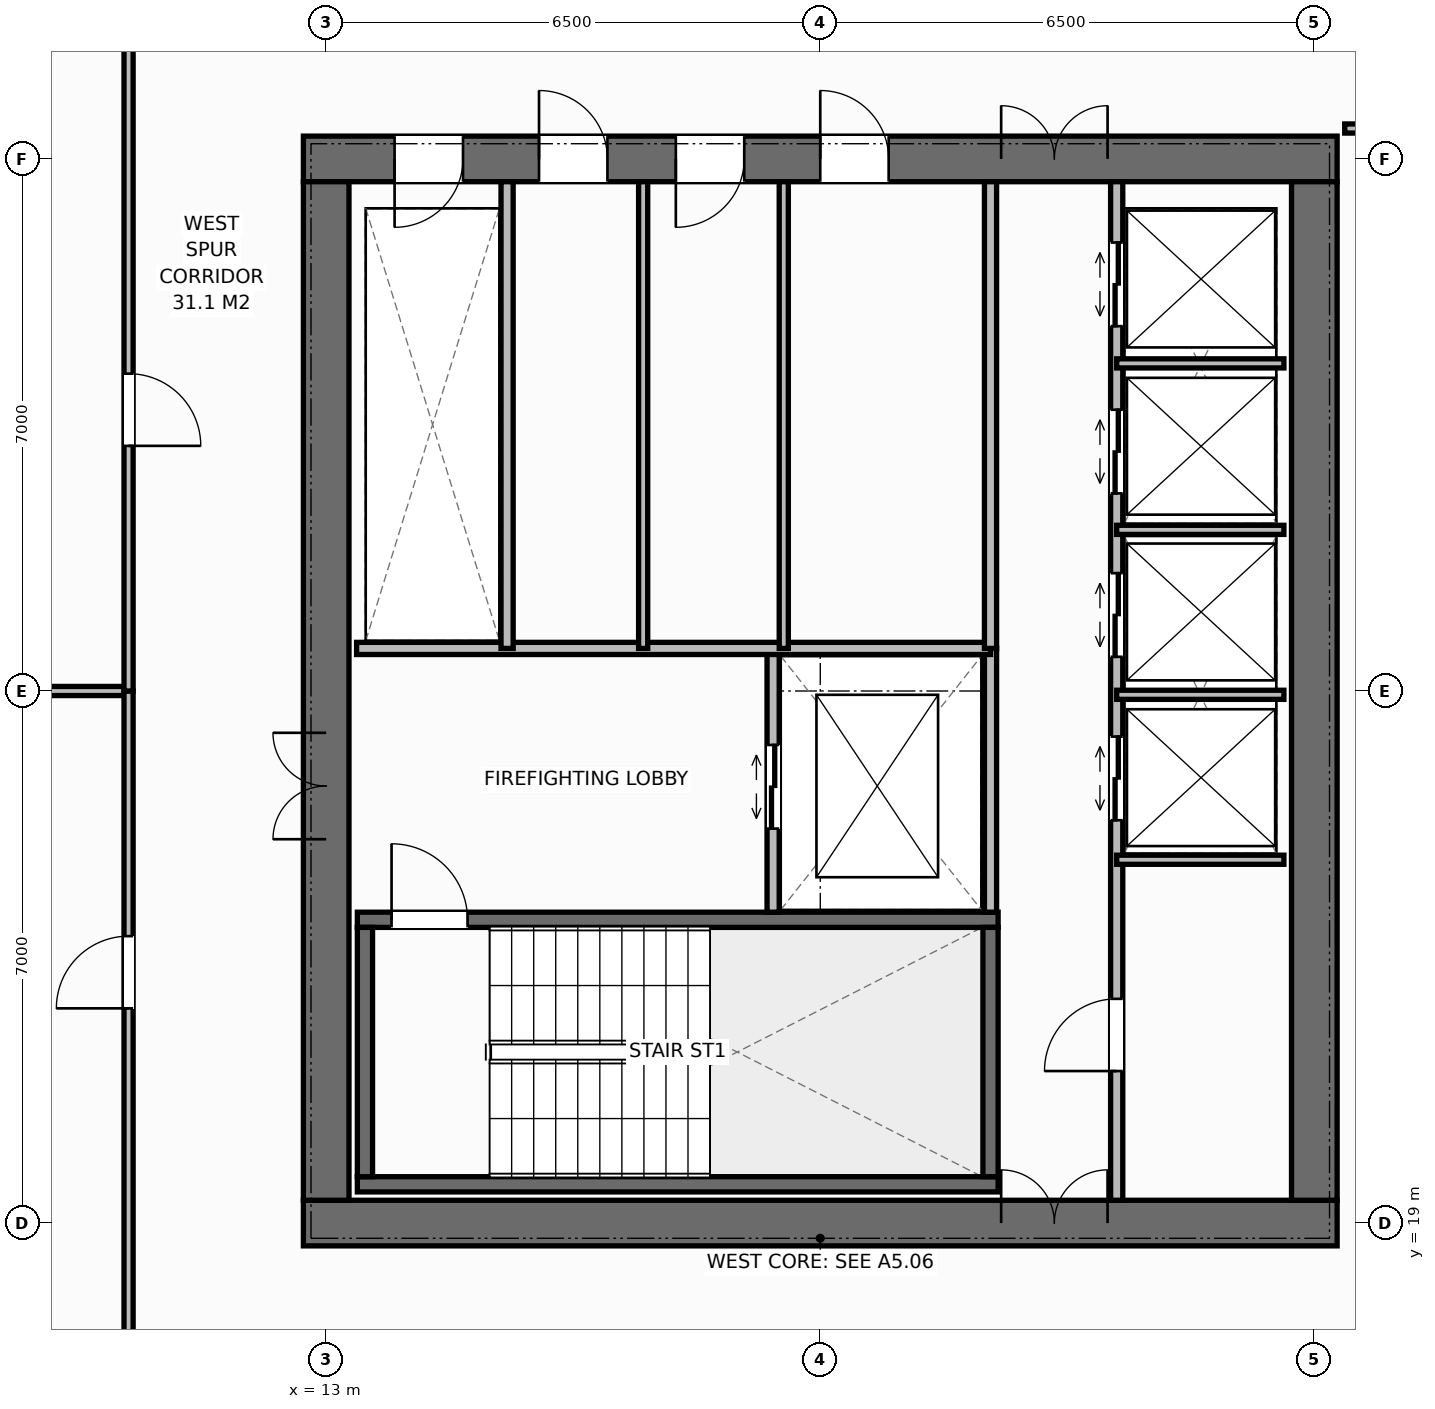
"""IFC4 building model, lengths in metres.
Left out: names, types, materials, properties, quantities, classifications, styles, units other than length and angle.
Written with IfcOpenShell. Run it as: python <this file> out.ifc"""

import sys

from ifc_helpers import new_model, si_unit, direction, frame, frame_2d, origin, place, context, subcontext, project, spatial, rectangle, extrude, element, fill, save


model = new_model("IFC4")
c1 = context("Model", 3, precision=1e-05, world=origin(), true_north=direction((0.0, 1.0)))
c2 = subcontext(c1, "Body", "Model", "MODEL_VIEW")
j1 = project(units=[si_unit("LENGTHUNIT", "METRE"), si_unit("PLANEANGLEUNIT", "RADIAN")], contexts=[c1])
p1 = place(None, origin())
s1 = spatial("IfcSite", under=j1, at=p1, CompositionType="ELEMENT")
p2 = place(p1, origin())
s2 = spatial("IfcBuilding", under=s1, at=p2, CompositionType="ELEMENT")
p3 = place(p2, frame((0.0, 0.0, 144.2)))
s3 = spatial("IfcBuildingStorey", under=s2, at=p3, CompositionType="ELEMENT", Elevation=144.2)
p4 = place(p3, frame((12.7, 19.0, 0.0), z_axis=(0.0, 0.0, 1.0), x_axis=(1.0, 0.0, 0.0)))
e1 = element("IfcWall", 1, at=p4, inside=s3, PredefinedType="SHEAR", context=c2, shape_type="SweptSolid", body=[
    extrude(rectangle(XDim=13.6, YDim=0.6, at=frame_2d((6.8, 0.0))), origin(), (0.0, 0.0, 1.0), 3.8),
])
p5 = place(p4, frame((9.18, 0.0, 0.0)))
e2 = element("IfcOpeningElement", 2, at=p5, cuts=e1, PredefinedType="OPENING", context=c2, shape_type="SweptSolid", body=[
    extrude(rectangle(XDim=1.4, YDim=2.2, at=frame_2d((0.7, 1.1))), frame((0.0, 0.31, 0.0), z_axis=(0.0, -1.0, 0.0), x_axis=(1.0, 0.0, 0.0)), (0.0, 0.0, 1.0), 0.62),
])
p6 = place(p3, frame((12.7, 33.0, 0.0), z_axis=(0.0, 0.0, 1.0), x_axis=(1.0, 0.0, 0.0)))
e3 = element("IfcWall", 3, at=p6, inside=s3, PredefinedType="SHEAR", context=c2, shape_type="SweptSolid", body=[
    extrude(rectangle(XDim=13.6, YDim=0.6, at=frame_2d((6.8, 0.0))), origin(), (0.0, 0.0, 1.0), 3.8),
])
p7 = place(p6, frame((1.2, 0.0, 0.0)))
e4 = element("IfcOpeningElement", 4, at=p7, cuts=e3, PredefinedType="OPENING", context=c2, shape_type="SweptSolid", body=[
    extrude(rectangle(XDim=0.9, YDim=2.15, at=frame_2d((0.45, 1.075))), frame((0.0, 0.31, 0.0), z_axis=(0.0, -1.0, 0.0), x_axis=(1.0, 0.0, 0.0)), (0.0, 0.0, 1.0), 0.62),
])
p8 = place(p6, frame((3.1, 0.0, 0.0)))
e5 = element("IfcOpeningElement", 5, at=p8, cuts=e3, PredefinedType="OPENING", context=c2, shape_type="SweptSolid", body=[
    extrude(rectangle(XDim=0.9, YDim=2.15, at=frame_2d((0.45, 1.075))), frame((0.0, 0.31, 0.0), z_axis=(0.0, -1.0, 0.0), x_axis=(1.0, 0.0, 0.0)), (0.0, 0.0, 1.0), 0.62),
])
p9 = place(p6, frame((4.9, 0.0, 0.0)))
e6 = element("IfcOpeningElement", 6, at=p9, cuts=e3, PredefinedType="OPENING", context=c2, shape_type="SweptSolid", body=[
    extrude(rectangle(XDim=0.9, YDim=2.15, at=frame_2d((0.45, 1.075))), frame((0.0, 0.31, 0.0), z_axis=(0.0, -1.0, 0.0), x_axis=(1.0, 0.0, 0.0)), (0.0, 0.0, 1.0), 0.62),
])
p10 = place(p6, frame((6.8, 0.0, 0.0)))
e7 = element("IfcOpeningElement", 7, at=p10, cuts=e3, PredefinedType="OPENING", context=c2, shape_type="SweptSolid", body=[
    extrude(rectangle(XDim=0.9, YDim=2.15, at=frame_2d((0.45, 1.075))), frame((0.0, 0.31, 0.0), z_axis=(0.0, -1.0, 0.0), x_axis=(1.0, 0.0, 0.0)), (0.0, 0.0, 1.0), 0.62),
])
p11 = place(p6, frame((9.18, 0.0, 0.0)))
e8 = element("IfcOpeningElement", 8, at=p11, cuts=e3, PredefinedType="OPENING", context=c2, shape_type="SweptSolid", body=[
    extrude(rectangle(XDim=1.4, YDim=2.2, at=frame_2d((0.7, 1.1))), frame((0.0, 0.31, 0.0), z_axis=(0.0, -1.0, 0.0), x_axis=(1.0, 0.0, 0.0)), (0.0, 0.0, 1.0), 0.62),
])
p12 = place(p3, frame((13.0, 19.3, 0.0), z_axis=(0.0, 0.0, 1.0), x_axis=(0.0, 1.0, 0.0)))
e9 = element("IfcWall", 9, at=p12, inside=s3, PredefinedType="SHEAR", context=c2, shape_type="SweptSolid", body=[
    extrude(rectangle(XDim=13.4, YDim=0.6, at=frame_2d((6.7, 0.0))), origin(), (0.0, 0.0, 1.0), 3.8),
])
p13 = place(p12, frame((4.75, 0.0, 0.0)))
e10 = element("IfcOpeningElement", 10, at=p13, cuts=e9, PredefinedType="OPENING", context=c2, shape_type="SweptSolid", body=[
    extrude(rectangle(XDim=1.4, YDim=2.2, at=frame_2d((0.7, 1.1))), frame((0.0, 0.31, 0.0), z_axis=(0.0, -1.0, 0.0), x_axis=(1.0, 0.0, 0.0)), (0.0, 0.0, 1.0), 0.62),
])
p14 = place(p3, frame((26.0, 19.3, 0.0), z_axis=(0.0, 0.0, 1.0), x_axis=(0.0, 1.0, 0.0)))
e11 = element("IfcWall", 11, at=p14, inside=s3, PredefinedType="SHEAR", context=c2, shape_type="SweptSolid", body=[
    extrude(rectangle(XDim=13.4, YDim=0.6, at=frame_2d((6.7, 0.0))), origin(), (0.0, 0.0, 1.0), 3.8),
])
p15 = place(p3, frame((13.41, 19.51, 0.0), z_axis=(0.0, 0.0, 1.0), x_axis=(1.0, 0.0, 0.0)))
e12 = element("IfcWall", 12, at=p15, inside=s3, PredefinedType="SHEAR", context=c2, shape_type="SweptSolid", body=[
    extrude(rectangle(XDim=8.43, YDim=0.2, at=frame_2d((4.215, 0.0))), origin(), (0.0, 0.0, 1.0), 3.8),
])
p16 = place(p3, frame((13.41, 22.99, 0.0), z_axis=(0.0, 0.0, 1.0), x_axis=(1.0, 0.0, 0.0)))
e13 = element("IfcWall", 13, at=p16, inside=s3, PredefinedType="SHEAR", context=c2, shape_type="SweptSolid", body=[
    extrude(rectangle(XDim=8.43, YDim=0.2, at=frame_2d((4.215, 0.0))), origin(), (0.0, 0.0, 1.0), 3.8),
])
p17 = place(p16, frame((0.45, 0.0, 0.0)))
e14 = element("IfcOpeningElement", 14, at=p17, cuts=e13, PredefinedType="OPENING", context=c2, shape_type="SweptSolid", body=[
    extrude(rectangle(XDim=1.0, YDim=2.15, at=frame_2d((0.5, 1.075))), frame((0.0, 0.11, 0.0), z_axis=(0.0, -1.0, 0.0), x_axis=(1.0, 0.0, 0.0)), (0.0, 0.0, 1.0), 0.22),
])
for number, where, z_axis, x_axis in (
    (15, (13.51, 19.61, 0.0), (0.0, 0.0, 1.0), (0.0, 1.0, 0.0)),
    (16, (21.74, 19.61, 0.0), (0.0, 0.0, 1.0), (0.0, 1.0, 0.0)),
):
    element("IfcWall", number, at=place(p3, frame(where, z_axis=z_axis, x_axis=x_axis)), inside=s3, PredefinedType="SHEAR", context=c2, shape_type="SweptSolid", body=[
        extrude(rectangle(XDim=3.28, YDim=0.2, at=frame_2d((1.64, 0.0))), origin(), (0.0, 0.0, 1.0), 3.8),
    ])
p18 = place(p3, frame((21.74, 23.09, 0.0), z_axis=(0.0, 0.0, 1.0), x_axis=(0.0, 1.0, 0.0)))
e17 = element("IfcWall", 17, at=p18, inside=s3, PredefinedType="STANDARD", context=c2, shape_type="SweptSolid", body=[
    extrude(rectangle(XDim=3.47, YDim=0.16, at=frame_2d((1.735, 0.0))), origin(), (0.0, 0.0, 1.0), 3.572),
])
p19 = place(p3, frame((18.88, 23.09, 0.0), z_axis=(0.0, 0.0, 1.0), x_axis=(0.0, 1.0, 0.0)))
e18 = element("IfcWall", 18, at=p19, inside=s3, PredefinedType="STANDARD", context=c2, shape_type="SweptSolid", body=[
    extrude(rectangle(XDim=3.47, YDim=0.16, at=frame_2d((1.735, 0.0))), origin(), (0.0, 0.0, 1.0), 3.572),
])
p20 = place(p19, frame((1.1, 0.0, 0.0)))
e19 = element("IfcOpeningElement", 19, at=p20, cuts=e18, PredefinedType="OPENING", context=c2, shape_type="SweptSolid", body=[
    extrude(rectangle(XDim=1.1, YDim=2.2, at=frame_2d((0.55, 1.1))), frame((0.0, 0.09, 0.0), z_axis=(0.0, -1.0, 0.0), x_axis=(1.0, 0.0, 0.0)), (0.0, 0.0, 1.0), 0.18),
])
p21 = place(p3, frame((13.4, 26.56, 0.0), z_axis=(0.0, 0.0, 1.0), x_axis=(1.0, 0.0, 0.0)))
e20 = element("IfcWall", 20, at=p21, inside=s3, PredefinedType="STANDARD", context=c2, shape_type="SweptSolid", body=[
    extrude(rectangle(XDim=8.34, YDim=0.16, at=frame_2d((4.17, 0.0))), origin(), (0.0, 0.0, 1.0), 3.572),
])
p22 = place(p3, frame((15.38, 26.56, 0.0), z_axis=(0.0, 0.0, 1.0), x_axis=(0.0, 1.0, 0.0)))
e21 = element("IfcWall", 21, at=p22, inside=s3, PredefinedType="STANDARD", context=c2, shape_type="SweptSolid", body=[
    extrude(rectangle(XDim=6.14, YDim=0.16, at=frame_2d((3.07, 0.0))), origin(), (0.0, 0.0, 1.0), 3.572),
])
for number, where, z_axis, x_axis in (
    (22, (17.17, 26.56, 0.0), (0.0, 0.0, 1.0), (0.0, 1.0, 0.0)),
    (23, (19.02, 26.56, 0.0), (0.0, 0.0, 1.0), (0.0, 1.0, 0.0)),
):
    element("IfcWall", number, at=place(p3, frame(where, z_axis=z_axis, x_axis=x_axis)), inside=s3, PredefinedType="PARTITIONING", context=c2, shape_type="SweptSolid", body=[
        extrude(rectangle(XDim=6.14, YDim=0.12, at=frame_2d((3.07, 0.0))), origin(), (0.0, 0.0, 1.0), 3.572),
    ])
p23 = place(p3, frame((21.74, 26.56, 0.0), z_axis=(0.0, 0.0, 1.0), x_axis=(0.0, 1.0, 0.0)))
e24 = element("IfcWall", 24, at=p23, inside=s3, PredefinedType="STANDARD", context=c2, shape_type="SweptSolid", body=[
    extrude(rectangle(XDim=6.14, YDim=0.16, at=frame_2d((3.07, 0.0))), origin(), (0.0, 0.0, 1.0), 3.572),
])
p24 = place(p3, frame((23.4, 19.3, 0.0), z_axis=(0.0, 0.0, 1.0), x_axis=(0.0, 1.0, 0.0)))
e25 = element("IfcWall", 25, at=p24, inside=s3, PredefinedType="STANDARD", context=c2, shape_type="SweptSolid", body=[
    extrude(rectangle(XDim=13.4, YDim=0.16, at=frame_2d((6.7, 0.0))), origin(), (0.0, 0.0, 1.0), 3.572),
])
p25 = place(p24, frame((1.7, 0.0, 0.0)))
e26 = element("IfcOpeningElement", 26, at=p25, cuts=e25, PredefinedType="OPENING", context=c2, shape_type="SweptSolid", body=[
    extrude(rectangle(XDim=0.95, YDim=2.15, at=frame_2d((0.475, 1.075))), frame((0.0, 0.09, 0.0), z_axis=(0.0, -1.0, 0.0), x_axis=(1.0, 0.0, 0.0)), (0.0, 0.0, 1.0), 0.18),
])
p26 = place(p24, frame((5.0, 0.0, 0.0)))
e27 = element("IfcOpeningElement", 27, at=p26, cuts=e25, PredefinedType="OPENING", context=c2, shape_type="SweptSolid", body=[
    extrude(rectangle(XDim=1.1, YDim=2.2, at=frame_2d((0.55, 1.1))), frame((0.0, 0.09, 0.0), z_axis=(0.0, -1.0, 0.0), x_axis=(1.0, 0.0, 0.0)), (0.0, 0.0, 1.0), 0.18),
])
p27 = place(p24, frame((7.15, 0.0, 0.0)))
e28 = element("IfcOpeningElement", 28, at=p27, cuts=e25, PredefinedType="OPENING", context=c2, shape_type="SweptSolid", body=[
    extrude(rectangle(XDim=1.1, YDim=2.2, at=frame_2d((0.55, 1.1))), frame((0.0, 0.09, 0.0), z_axis=(0.0, -1.0, 0.0), x_axis=(1.0, 0.0, 0.0)), (0.0, 0.0, 1.0), 0.18),
])
p28 = place(p24, frame((9.3, 0.0, 0.0)))
e29 = element("IfcOpeningElement", 29, at=p28, cuts=e25, PredefinedType="OPENING", context=c2, shape_type="SweptSolid", body=[
    extrude(rectangle(XDim=1.1, YDim=2.2, at=frame_2d((0.55, 1.1))), frame((0.0, 0.09, 0.0), z_axis=(0.0, -1.0, 0.0), x_axis=(1.0, 0.0, 0.0)), (0.0, 0.0, 1.0), 0.18),
])
p29 = place(p24, frame((11.5, 0.0, 0.0)))
e30 = element("IfcOpeningElement", 30, at=p29, cuts=e25, PredefinedType="OPENING", context=c2, shape_type="SweptSolid", body=[
    extrude(rectangle(XDim=1.1, YDim=2.2, at=frame_2d((0.55, 1.1))), frame((0.0, 0.09, 0.0), z_axis=(0.0, -1.0, 0.0), x_axis=(1.0, 0.0, 0.0)), (0.0, 0.0, 1.0), 0.18),
])
for number, where, z_axis, x_axis in (
    (31, (23.4, 23.78, 0.0), (0.0, 0.0, 1.0), (1.0, 0.0, 0.0)),
    (32, (23.4, 25.95, 0.0), (0.0, 0.0, 1.0), (1.0, 0.0, 0.0)),
    (33, (23.4, 28.12, 0.0), (0.0, 0.0, 1.0), (1.0, 0.0, 0.0)),
    (34, (23.4, 30.31, 0.0), (0.0, 0.0, 1.0), (1.0, 0.0, 0.0)),
):
    element("IfcWall", number, at=place(p3, frame(where, z_axis=z_axis, x_axis=x_axis)), inside=s3, PredefinedType="PARTITIONING", context=c2, shape_type="SweptSolid", body=[
        extrude(rectangle(XDim=2.2, YDim=0.12, at=frame_2d((1.1, 0.0))), origin(), (0.0, 0.0, 1.0), 3.572),
    ])
p30 = place(p3, frame((26.4, 33.4, 0.0), z_axis=(0.0, 0.0, 1.0), x_axis=(1.0, 0.0, 0.0)))
e35 = element("IfcWall", 35, at=p30, inside=s3, PredefinedType="PARTITIONING", context=c2, shape_type="SweptSolid", body=[
    extrude(rectangle(XDim=3.6, YDim=0.12, at=frame_2d((1.8, 0.0))), origin(), (0.0, 0.0, 1.0), 3.572),
])
p31 = place(p30, frame((1.1, 0.0, 0.0)))
e36 = element("IfcOpeningElement", 36, at=p31, cuts=e35, PredefinedType="OPENING", context=c2, shape_type="SweptSolid", body=[
    extrude(rectangle(XDim=0.95, YDim=2.15, at=frame_2d((0.475, 1.075))), frame((0.0, 0.07, 0.0), z_axis=(0.0, -1.0, 0.0), x_axis=(1.0, 0.0, 0.0)), (0.0, 0.0, 1.0), 0.14),
])
p32 = place(p3, frame((3.82, 26.0, 0.0), z_axis=(0.0, 0.0, 1.0), x_axis=(1.0, 0.0, 0.0)))
e37 = element("IfcWall", 37, at=p32, inside=s3, PredefinedType="PARTITIONING", context=c2, shape_type="SweptSolid", body=[
    extrude(rectangle(XDim=6.58, YDim=0.12, at=frame_2d((3.29, 0.0))), origin(), (0.0, 0.0, 1.0), 3.572),
])
p33 = place(p3, frame((10.4, 16.5, 0.0), z_axis=(0.0, 0.0, 1.0), x_axis=(0.0, 1.0, 0.0)))
e38 = element("IfcWall", 38, at=p33, inside=s3, PredefinedType="PARTITIONING", context=c2, shape_type="SweptSolid", body=[
    extrude(rectangle(XDim=9.5, YDim=0.12, at=frame_2d((4.75, 0.0))), origin(), (0.0, 0.0, 1.0), 3.572),
])
p34 = place(p33, frame((5.325, 0.0, 0.0)))
e39 = element("IfcOpeningElement", 39, at=p34, cuts=e38, PredefinedType="OPENING", context=c2, shape_type="SweptSolid", body=[
    extrude(rectangle(XDim=0.95, YDim=2.15, at=frame_2d((0.475, 1.075))), frame((0.0, 0.07, 0.0), z_axis=(0.0, -1.0, 0.0), x_axis=(1.0, 0.0, 0.0)), (0.0, 0.0, 1.0), 0.14),
])
p35 = place(p3, frame((10.4, 26.0, 0.0), z_axis=(0.0, 0.0, 1.0), x_axis=(0.0, 1.0, 0.0)))
e40 = element("IfcWall", 40, at=p35, inside=s3, PredefinedType="PARTITIONING", context=c2, shape_type="SweptSolid", body=[
    extrude(rectangle(XDim=9.5, YDim=0.12, at=frame_2d((4.75, 0.0))), origin(), (0.0, 0.0, 1.0), 3.572),
])
p36 = place(p35, frame((3.225, 0.0, 0.0)))
e41 = element("IfcOpeningElement", 41, at=p36, cuts=e40, PredefinedType="OPENING", context=c2, shape_type="SweptSolid", body=[
    extrude(rectangle(XDim=0.95, YDim=2.15, at=frame_2d((0.475, 1.075))), frame((0.0, 0.07, 0.0), z_axis=(0.0, -1.0, 0.0), x_axis=(1.0, 0.0, 0.0)), (0.0, 0.0, 1.0), 0.14),
])
p37 = place(p17, origin())
e42 = element("IfcDoor", 42, at=p37, inside=s3, OperationType="SINGLE_SWING_LEFT", PredefinedType="DOOR", context=c2, shape_type="SweptSolid", body=[
    extrude(rectangle(XDim=1.0, YDim=2.15, at=frame_2d((0.5, 1.075))), frame((0.0, 0.025, 0.0), z_axis=(0.0, -1.0, 0.0), x_axis=(1.0, 0.0, 0.0)), (0.0, 0.0, 1.0), 0.05),
])
fill(e14, e42)
p38 = place(p13, origin())
e43 = element("IfcDoor", 43, at=p38, inside=s3, OperationType="DOUBLE_DOOR_SINGLE_SWING", PredefinedType="DOOR", context=c2, shape_type="SweptSolid", body=[
    extrude(rectangle(XDim=1.4, YDim=2.2, at=frame_2d((0.7, 1.1))), frame((0.0, 0.025, 0.0), z_axis=(0.0, -1.0, 0.0), x_axis=(1.0, 0.0, 0.0)), (0.0, 0.0, 1.0), 0.05),
])
fill(e10, e43)
p39 = place(p20, origin())
e44 = element("IfcDoor", 44, at=p39, inside=s3, OperationType="DOUBLE_DOOR_SLIDING", PredefinedType="DOOR", context=c2, shape_type="SweptSolid", body=[
    extrude(rectangle(XDim=1.1, YDim=2.2, at=frame_2d((0.55, 1.1))), frame((0.0, 0.025, 0.0), z_axis=(0.0, -1.0, 0.0), x_axis=(1.0, 0.0, 0.0)), (0.0, 0.0, 1.0), 0.05),
])
fill(e19, e44)
p40 = place(p7, origin())
e45 = element("IfcDoor", 45, at=p40, inside=s3, OperationType="SINGLE_SWING_RIGHT", PredefinedType="DOOR", context=c2, shape_type="SweptSolid", body=[
    extrude(rectangle(XDim=0.9, YDim=2.15, at=frame_2d((0.45, 1.075))), frame((0.0, -0.025, 0.0), z_axis=(0.0, -1.0, 0.0), x_axis=(1.0, 0.0, 0.0)), (0.0, 0.0, 1.0), 0.05),
])
fill(e4, e45)
p41 = place(p8, origin())
e46 = element("IfcDoor", 46, at=p41, inside=s3, OperationType="SINGLE_SWING_LEFT", PredefinedType="DOOR", context=c2, shape_type="SweptSolid", body=[
    extrude(rectangle(XDim=0.9, YDim=2.15, at=frame_2d((0.45, 1.075))), frame((0.0, -0.025, 0.0), z_axis=(0.0, -1.0, 0.0), x_axis=(1.0, 0.0, 0.0)), (0.0, 0.0, 1.0), 0.05),
])
fill(e5, e46)
p42 = place(p9, origin())
e47 = element("IfcDoor", 47, at=p42, inside=s3, OperationType="SINGLE_SWING_RIGHT", PredefinedType="DOOR", context=c2, shape_type="SweptSolid", body=[
    extrude(rectangle(XDim=0.9, YDim=2.15, at=frame_2d((0.45, 1.075))), frame((0.0, -0.025, 0.0), z_axis=(0.0, -1.0, 0.0), x_axis=(1.0, 0.0, 0.0)), (0.0, 0.0, 1.0), 0.05),
])
fill(e6, e47)
p43 = place(p10, origin())
e48 = element("IfcDoor", 48, at=p43, inside=s3, OperationType="SINGLE_SWING_LEFT", PredefinedType="DOOR", context=c2, shape_type="SweptSolid", body=[
    extrude(rectangle(XDim=0.9, YDim=2.15, at=frame_2d((0.45, 1.075))), frame((0.0, -0.025, 0.0), z_axis=(0.0, -1.0, 0.0), x_axis=(1.0, 0.0, 0.0)), (0.0, 0.0, 1.0), 0.05),
])
fill(e7, e48)
p44 = place(p5, origin())
e49 = element("IfcDoor", 49, at=p44, inside=s3, OperationType="DOUBLE_DOOR_SINGLE_SWING", PredefinedType="DOOR", context=c2, shape_type="SweptSolid", body=[
    extrude(rectangle(XDim=1.4, YDim=2.2, at=frame_2d((0.7, 1.1))), frame((0.0, 0.075, 0.0), z_axis=(0.0, -1.0, 0.0), x_axis=(1.0, 0.0, 0.0)), (0.0, 0.0, 1.0), 0.05),
])
fill(e2, e49)
p45 = place(p11, origin())
e50 = element("IfcDoor", 50, at=p45, inside=s3, OperationType="DOUBLE_DOOR_SINGLE_SWING", PredefinedType="DOOR", context=c2, shape_type="SweptSolid", body=[
    extrude(rectangle(XDim=1.4, YDim=2.2, at=frame_2d((0.7, 1.1))), frame((0.0, -0.025, 0.0), z_axis=(0.0, -1.0, 0.0), x_axis=(1.0, 0.0, 0.0)), (0.0, 0.0, 1.0), 0.05),
])
fill(e8, e50)
p46 = place(p25, origin())
e51 = element("IfcDoor", 51, at=p46, inside=s3, OperationType="SINGLE_SWING_LEFT", PredefinedType="DOOR", context=c2, shape_type="SweptSolid", body=[
    extrude(rectangle(XDim=0.95, YDim=2.15, at=frame_2d((0.475, 1.075))), frame((0.0, 0.025, 0.0), z_axis=(0.0, -1.0, 0.0), x_axis=(1.0, 0.0, 0.0)), (0.0, 0.0, 1.0), 0.05),
])
fill(e26, e51)
p47 = place(p26, origin())
e52 = element("IfcDoor", 52, at=p47, inside=s3, OperationType="DOUBLE_DOOR_SLIDING", PredefinedType="DOOR", context=c2, shape_type="SweptSolid", body=[
    extrude(rectangle(XDim=1.1, YDim=2.2, at=frame_2d((0.55, 1.1))), frame((0.0, 0.025, 0.0), z_axis=(0.0, -1.0, 0.0), x_axis=(1.0, 0.0, 0.0)), (0.0, 0.0, 1.0), 0.05),
])
fill(e27, e52)
p48 = place(p27, origin())
e53 = element("IfcDoor", 53, at=p48, inside=s3, OperationType="DOUBLE_DOOR_SLIDING", PredefinedType="DOOR", context=c2, shape_type="SweptSolid", body=[
    extrude(rectangle(XDim=1.1, YDim=2.2, at=frame_2d((0.55, 1.1))), frame((0.0, 0.025, 0.0), z_axis=(0.0, -1.0, 0.0), x_axis=(1.0, 0.0, 0.0)), (0.0, 0.0, 1.0), 0.05),
])
fill(e28, e53)
p49 = place(p28, origin())
e54 = element("IfcDoor", 54, at=p49, inside=s3, OperationType="DOUBLE_DOOR_SLIDING", PredefinedType="DOOR", context=c2, shape_type="SweptSolid", body=[
    extrude(rectangle(XDim=1.1, YDim=2.2, at=frame_2d((0.55, 1.1))), frame((0.0, 0.025, 0.0), z_axis=(0.0, -1.0, 0.0), x_axis=(1.0, 0.0, 0.0)), (0.0, 0.0, 1.0), 0.05),
])
fill(e29, e54)
p50 = place(p29, origin())
e55 = element("IfcDoor", 55, at=p50, inside=s3, OperationType="DOUBLE_DOOR_SLIDING", PredefinedType="DOOR", context=c2, shape_type="SweptSolid", body=[
    extrude(rectangle(XDim=1.1, YDim=2.2, at=frame_2d((0.55, 1.1))), frame((0.0, 0.025, 0.0), z_axis=(0.0, -1.0, 0.0), x_axis=(1.0, 0.0, 0.0)), (0.0, 0.0, 1.0), 0.05),
])
fill(e30, e55)
p51 = place(p34, origin())
e56 = element("IfcDoor", 56, at=p51, inside=s3, OperationType="SINGLE_SWING_LEFT", PredefinedType="DOOR", context=c2, shape_type="SweptSolid", body=[
    extrude(rectangle(XDim=0.95, YDim=2.15, at=frame_2d((0.475, 1.075))), frame((0.0, 0.025, 0.0), z_axis=(0.0, -1.0, 0.0), x_axis=(1.0, 0.0, 0.0)), (0.0, 0.0, 1.0), 0.05),
])
fill(e39, e56)
p52 = place(p36, origin())
e57 = element("IfcDoor", 57, at=p52, inside=s3, OperationType="SINGLE_SWING_RIGHT", PredefinedType="DOOR", context=c2, shape_type="SweptSolid", body=[
    extrude(rectangle(XDim=0.95, YDim=2.15, at=frame_2d((0.475, 1.075))), frame((0.0, 0.025, 0.0), z_axis=(0.0, -1.0, 0.0), x_axis=(1.0, 0.0, 0.0)), (0.0, 0.0, 1.0), 0.05),
])
fill(e41, e57)
save(model, sys.argv[1])
